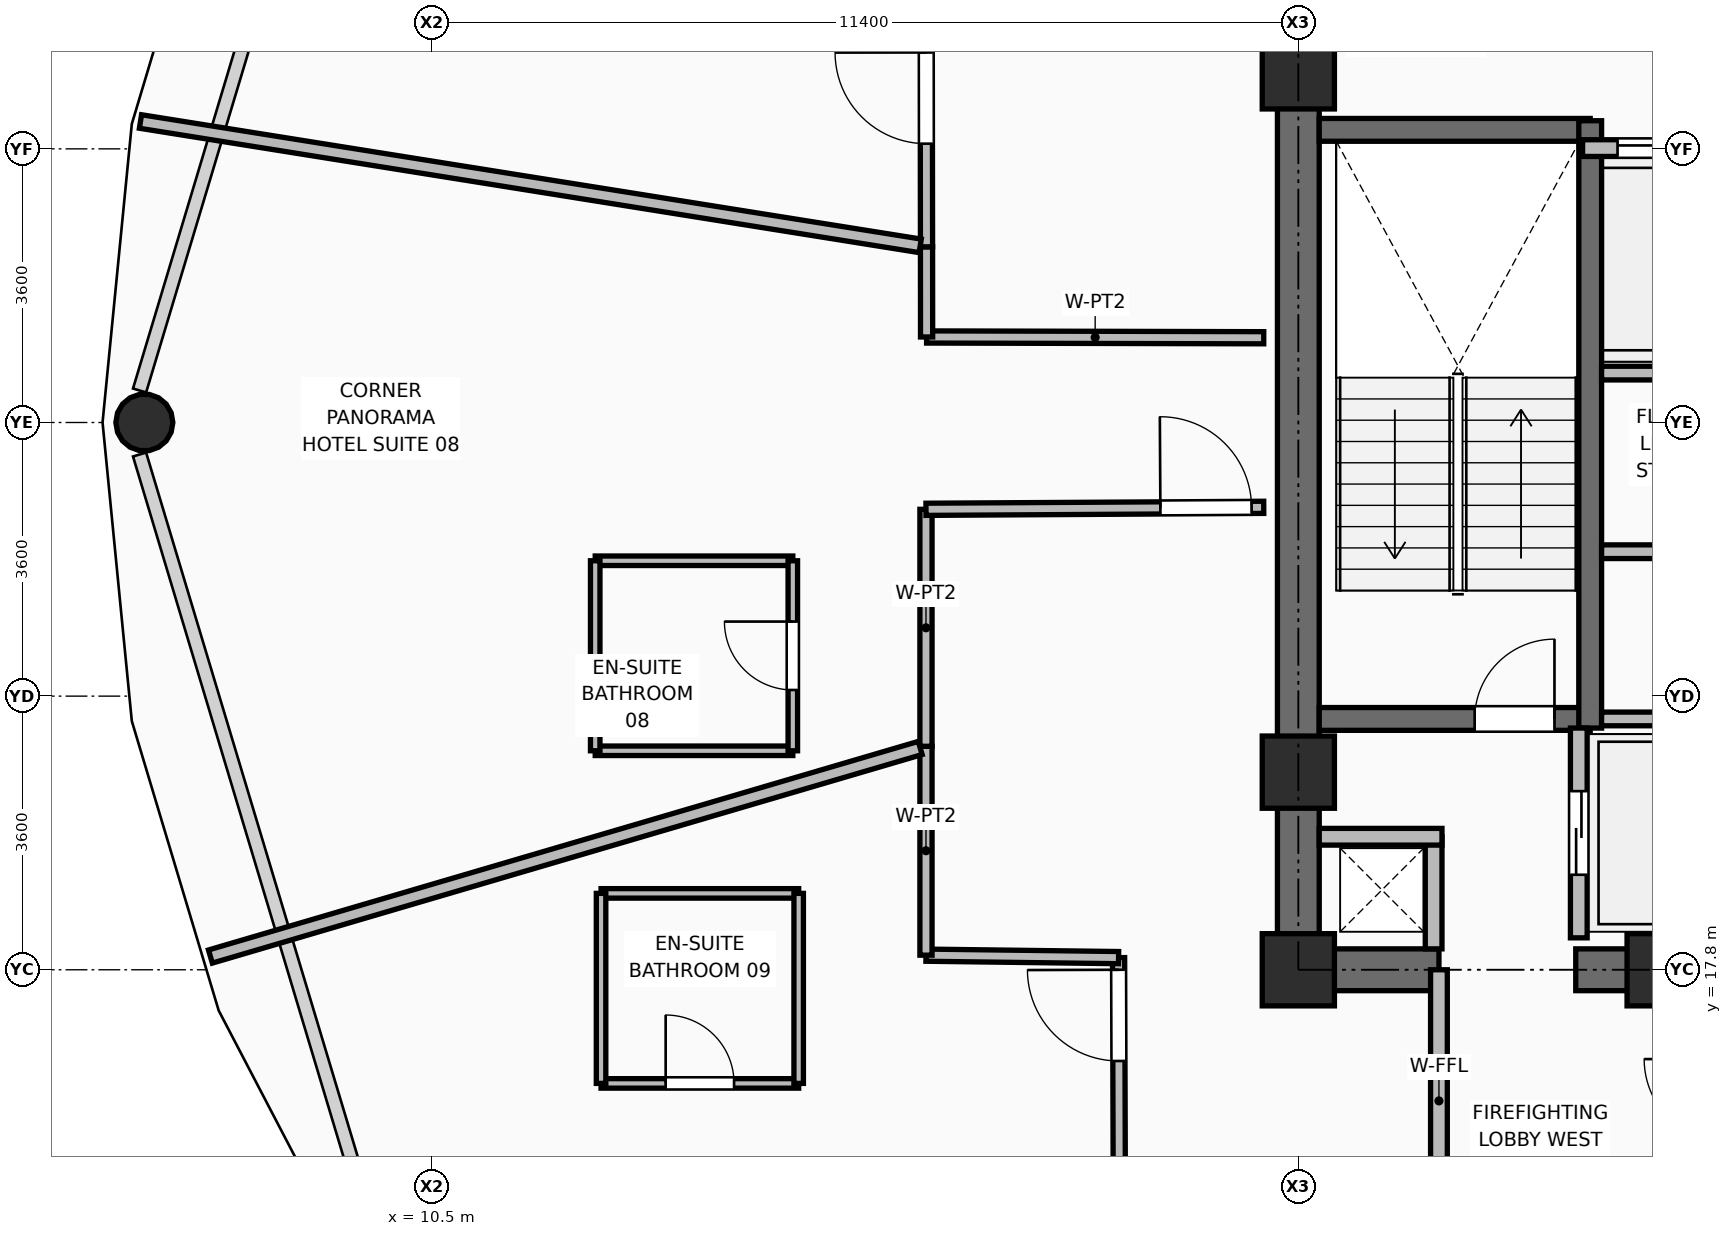
"""IFC4 building model, lengths in metres.
Left out: names, types, materials, properties, quantities, classifications, styles, units other than length and angle.
Written with IfcOpenShell. Run it as: python <this file> out.ifc"""

import sys

from ifc_helpers import new_model, si_unit, direction, frame, frame_2d, origin, origin_2d, place, context, subcontext, project, spatial, rectangle, hollow_circle, extrude, element, fill, save


model = new_model("IFC4")
c1 = context("Model", 3, precision=1e-05, world=origin(), true_north=direction((0.0, 1.0)))
c2 = subcontext(c1, "Body", "Model", "MODEL_VIEW")
j1 = project(units=[si_unit("LENGTHUNIT", "METRE"), si_unit("PLANEANGLEUNIT", "RADIAN")], contexts=[c1])
p1 = place(None, origin())
s1 = spatial("IfcSite", under=j1, at=p1, CompositionType="ELEMENT")
p2 = place(p1, origin())
s2 = spatial("IfcBuilding", under=s1, at=p2, CompositionType="ELEMENT")
p3 = place(p2, frame((0.0, 0.0, 149.7)))
s3 = spatial("IfcBuildingStorey", under=s2, at=p3, CompositionType="ELEMENT", Elevation=149.7)
for number, where, z_axis, x_axis in (
    (1, (21.9, 17.8, 0.0), (0.0, 0.0, 1.0), (1.0, 0.0, 0.0)),
    (2, (26.7, 17.8, 0.0), (0.0, 0.0, 1.0), (1.0, 0.0, 0.0)),
    (3, (21.9, 20.4, 0.0), (0.0, 0.0, 1.0), (1.0, 0.0, 0.0)),
    (4, (21.9, 29.6, 0.0), (0.0, 0.0, 1.0), (1.0, 0.0, 0.0)),
):
    element("IfcColumn", number, at=place(p3, frame(where, z_axis=z_axis, x_axis=x_axis)), inside=s3, PredefinedType="COLUMN", context=c2, shape_type="SweptSolid", body=[
        extrude(rectangle(XDim=0.95, YDim=0.95, at=origin_2d()), origin(), (0.0, 0.0, 1.0), 3.75),
    ])
p4 = place(p3, frame((6.717, 25.0, 0.0), z_axis=(0.0, 0.0, 1.0), x_axis=(1.0, 0.0, 0.0)))
e5 = element("IfcColumn", 5, at=p4, inside=s3, PredefinedType="COLUMN", context=c2, shape_type="SweptSolid", body=[
    extrude(hollow_circle(Radius=0.375, WallThickness=0.035, at=origin_2d()), origin(), (0.0, 0.0, 1.0), 3.57),
])
p5 = place(p3, frame((21.625, 17.8, 0.0), z_axis=(0.0, 0.0, 1.0), x_axis=(1.0, 0.0, 0.0)))
e6 = element("IfcWall", 6, at=p5, inside=s3, PredefinedType="SHEAR", context=c2, shape_type="SweptSolid", body=[
    extrude(rectangle(XDim=2.125, YDim=0.55, at=frame_2d((1.062, 0.0))), origin(), (0.0, 0.0, 1.0), 3.57),
])
p6 = place(p3, frame((25.55, 17.8, 0.0), z_axis=(0.0, 0.0, 1.0), x_axis=(1.0, 0.0, 0.0)))
e7 = element("IfcWall", 7, at=p6, inside=s3, PredefinedType="SHEAR", context=c2, shape_type="SweptSolid", body=[
    extrude(rectangle(XDim=6.9, YDim=0.55, at=frame_2d((3.45, 0.0))), origin(), (0.0, 0.0, 1.0), 3.57),
])
p7 = place(p3, frame((21.9, 18.075, 0.0), z_axis=(0.0, 0.0, 1.0), x_axis=(0.0, 1.0, 0.0)))
e8 = element("IfcWall", 8, at=p7, inside=s3, PredefinedType="SHEAR", context=c2, shape_type="SweptSolid", body=[
    extrude(rectangle(XDim=14.1, YDim=0.55, at=frame_2d((7.05, 0.0))), origin(), (0.0, 0.0, 1.0), 3.57),
])
p8 = place(p3, frame((22.175, 21.1, 0.0), z_axis=(0.0, 0.0, 1.0), x_axis=(1.0, 0.0, 0.0)))
e9 = element("IfcWall", 9, at=p8, inside=s3, PredefinedType="SHEAR", context=c2, shape_type="SweptSolid", body=[
    extrude(rectangle(XDim=3.565, YDim=0.3, at=frame_2d((1.782, 0.0))), origin(), (0.0, 0.0, 1.0), 3.57),
])
p9 = place(p8, frame((2.045, 0.0, 0.0)))
e10 = element("IfcOpeningElement", 10, at=p9, cuts=e9, PredefinedType="OPENING", context=c2, shape_type="SweptSolid", body=[
    extrude(rectangle(XDim=1.05, YDim=2.1, at=frame_2d((0.525, 1.05))), frame((0.0, 0.16, 0.0), z_axis=(0.0, -1.0, 0.0), x_axis=(1.0, 0.0, 0.0)), (0.0, 0.0, 1.0), 0.32),
])
p10 = place(p3, frame((22.175, 28.85, 0.0), z_axis=(0.0, 0.0, 1.0), x_axis=(1.0, 0.0, 0.0)))
e11 = element("IfcWall", 11, at=p10, inside=s3, PredefinedType="SHEAR", context=c2, shape_type="SweptSolid", body=[
    extrude(rectangle(XDim=3.565, YDim=0.3, at=frame_2d((1.782, 0.0))), origin(), (0.0, 0.0, 1.0), 3.57),
])
p11 = place(p3, frame((25.74, 20.98, 0.0), z_axis=(0.0, 0.0, 1.0), x_axis=(0.0, 1.0, 0.0)))
e12 = element("IfcWall", 12, at=p11, inside=s3, PredefinedType="SHEAR", context=c2, shape_type="SweptSolid", body=[
    extrude(rectangle(XDim=7.99, YDim=0.3, at=frame_2d((3.995, 0.0))), origin(), (0.0, 0.0, 1.0), 3.57),
])
p12 = place(p3, frame((23.68, 18.075, 0.0), z_axis=(0.0, 0.0, 1.0), x_axis=(0.0, 1.0, 0.0)))
e13 = element("IfcWall", 13, at=p12, inside=s3, PredefinedType="PARTITIONING", context=c2, shape_type="SweptSolid", body=[
    extrude(rectangle(XDim=1.475, YDim=0.22, at=frame_2d((0.738, 0.0))), origin(), (0.0, 0.0, 1.0), 3.55),
])
p13 = place(p3, frame((22.175, 19.55, 0.0), z_axis=(0.0, 0.0, 1.0), x_axis=(1.0, 0.0, 0.0)))
e14 = element("IfcWall", 14, at=p13, inside=s3, PredefinedType="PARTITIONING", context=c2, shape_type="SweptSolid", body=[
    extrude(rectangle(XDim=1.615, YDim=0.22, at=frame_2d((0.808, 0.0))), origin(), (0.0, 0.0, 1.0), 2.595),
])
p14 = place(p3, frame((25.59, 18.22, 0.0), z_axis=(0.0, 0.0, 1.0), x_axis=(0.0, 1.0, 0.0)))
e15 = element("IfcWall", 15, at=p14, inside=s3, PredefinedType="PARTITIONING", context=c2, shape_type="SweptSolid", body=[
    extrude(rectangle(XDim=2.76, YDim=0.22, at=frame_2d((1.38, 0.0))), origin(), (0.0, 0.0, 1.0), 3.55),
])
p15 = place(p14, frame((0.83, 0.0, 0.0)))
e16 = element("IfcOpeningElement", 16, at=p15, cuts=e15, PredefinedType="OPENING", context=c2, shape_type="SweptSolid", body=[
    extrude(rectangle(XDim=1.1, YDim=2.2, at=frame_2d((0.55, 1.1))), frame((0.0, 0.12, 0.0), z_axis=(0.0, -1.0, 0.0), x_axis=(1.0, 0.0, 0.0)), (0.0, 0.0, 1.0), 0.24),
])
p16 = place(p3, frame((25.64, 28.61, 0.0), z_axis=(0.0, 0.0, 1.0), x_axis=(1.0, 0.0, 0.0)))
e17 = element("IfcWall", 17, at=p16, inside=s3, PredefinedType="PARTITIONING", context=c2, shape_type="SweptSolid", body=[
    extrude(rectangle(XDim=2.02, YDim=0.22, at=frame_2d((1.01, 0.0))), origin(), (0.0, 0.0, 1.0), 3.55),
])
p17 = place(p16, frame((0.46, 0.0, 0.0)))
e18 = element("IfcOpeningElement", 18, at=p17, cuts=e17, PredefinedType="OPENING", context=c2, shape_type="SweptSolid", body=[
    extrude(rectangle(XDim=1.1, YDim=2.2, at=frame_2d((0.55, 1.1))), frame((0.0, 0.12, 0.0), z_axis=(0.0, -1.0, 0.0), x_axis=(1.0, 0.0, 0.0)), (0.0, 0.0, 1.0), 0.24),
])
for number, where, z_axis, x_axis in (
    (19, (25.89, 21.1, 0.0), (0.0, 0.0, 1.0), (1.0, 0.0, 0.0)),
    (20, (25.89, 25.65, 0.0), (0.0, 0.0, 1.0), (1.0, 0.0, 0.0)),
):
    element("IfcWall", number, at=place(p3, frame(where, z_axis=z_axis, x_axis=x_axis)), inside=s3, PredefinedType="PARTITIONING", context=c2, shape_type="SweptSolid", body=[
        extrude(rectangle(XDim=1.7, YDim=0.18, at=frame_2d((0.85, 0.0))), origin(), (0.0, 0.0, 1.0), 3.55),
    ])
p18 = place(p3, frame((25.89, 23.3, 0.0), z_axis=(0.0, 0.0, 1.0), x_axis=(1.0, 0.0, 0.0)))
e21 = element("IfcWall", 21, at=p18, inside=s3, PredefinedType="PARTITIONING", context=c2, shape_type="SweptSolid", body=[
    extrude(rectangle(XDim=1.79, YDim=0.18, at=frame_2d((0.895, 0.0))), origin(), (0.0, 0.0, 1.0), 3.55),
])
p19 = place(p3, frame((23.75, 14.35, 0.0), z_axis=(0.0, 0.0, 1.0), x_axis=(0.0, 1.0, 0.0)))
e22 = element("IfcWall", 22, at=p19, inside=s3, PredefinedType="PARTITIONING", context=c2, shape_type="SweptSolid", body=[
    extrude(rectangle(XDim=3.45, YDim=0.22, at=frame_2d((1.725, 0.0))), origin(), (0.0, 0.0, 1.0), 3.006),
])
p20 = place(p3, frame((21.445, 26.115, 0.0), z_axis=(0.0, 0.0, 1.0), x_axis=(-0.999997454189, 0.002256460959, 0.0)))
e23 = element("IfcWall", 23, at=p20, inside=s3, PredefinedType="PARTITIONING", context=c2, shape_type="SweptSolid", body=[
    extrude(rectangle(XDim=4.436, YDim=0.16, at=frame_2d((2.218, 0.0))), origin(), (0.0, 0.0, 1.0), 2.595),
])
p21 = place(p3, frame((17.009, 26.125, 0.0), z_axis=(0.0, 0.0, 1.0), x_axis=(-0.00082338383, 0.999999661019, 0.0)))
e24 = element("IfcWall", 24, at=p21, inside=s3, PredefinedType="PARTITIONING", context=c2, shape_type="SweptSolid", body=[
    extrude(rectangle(XDim=1.186, YDim=0.16, at=frame_2d((0.593, 0.0))), origin(), (0.0, 0.0, 1.0), 3.55),
])
p22 = place(p3, frame((17.008, 27.311, 0.0), z_axis=(0.0, 0.0, 1.0), x_axis=(-0.001309879116, 0.999999142108, 0.0)))
e25 = element("IfcWall", 25, at=p22, inside=s3, PredefinedType="PARTITIONING", context=c2, shape_type="SweptSolid", body=[
    extrude(rectangle(XDim=3.914, YDim=0.16, at=frame_2d((1.957, 0.0))), origin(), (0.0, 0.0, 1.0), 3.55),
])
p23 = place(p22, frame((1.357, 0.0, 0.0)))
e26 = element("IfcOpeningElement", 26, at=p23, cuts=e25, PredefinedType="OPENING", context=c2, shape_type="SweptSolid", body=[
    extrude(rectangle(XDim=1.2, YDim=2.1, at=frame_2d((0.6, 1.05))), frame((0.0, 0.09, 0.0), z_axis=(0.0, -1.0, 0.0), x_axis=(1.0, 0.0, 0.0)), (0.0, 0.0, 1.0), 0.18),
])
p24 = place(p3, frame((19.548, 13.809, 0.0), z_axis=(0.0, 0.0, 1.0), x_axis=(-0.00317608091, 0.999994956242, 0.0)))
e27 = element("IfcWall", 27, at=p24, inside=s3, PredefinedType="PARTITIONING", context=c2, shape_type="SweptSolid", body=[
    extrude(rectangle(XDim=4.151, YDim=0.16, at=frame_2d((2.075, 0.0))), origin(), (0.0, 0.0, 1.0), 3.006),
])
p25 = place(p24, frame((2.791, 0.0, 0.0)))
e28 = element("IfcOpeningElement", 28, at=p25, cuts=e27, PredefinedType="OPENING", context=c2, shape_type="SweptSolid", body=[
    extrude(rectangle(XDim=1.2, YDim=2.1, at=frame_2d((0.6, 1.05))), frame((0.0, 0.09, 0.0), z_axis=(0.0, -1.0, 0.0), x_axis=(1.0, 0.0, 0.0)), (0.0, 0.0, 1.0), 0.18),
])
p26 = place(p3, frame((19.535, 17.96, 0.0), z_axis=(0.0, 0.0, 1.0), x_axis=(-0.999920356619, 0.01262063462, 0.0)))
e29 = element("IfcWall", 29, at=p26, inside=s3, PredefinedType="PARTITIONING", context=c2, shape_type="SweptSolid", body=[
    extrude(rectangle(XDim=2.534, YDim=0.16, at=frame_2d((1.267, 0.0))), origin(), (0.0, 0.0, 1.0), 3.55),
])
p27 = place(p3, frame((17.001, 17.992, 0.0), z_axis=(0.0, 0.0, 1.0), x_axis=(0.0, 1.0, 0.0)))
e30 = element("IfcWall", 30, at=p27, inside=s3, PredefinedType="PARTITIONING", context=c2, shape_type="SweptSolid", body=[
    extrude(rectangle(XDim=2.748, YDim=0.16, at=frame_2d((1.374, 0.0))), origin(), (0.0, 0.0, 1.0), 3.55),
])
p28 = place(p3, frame((17.001, 20.74, 0.0), z_axis=(0.0, 0.0, 1.0), x_axis=(0.0, 1.0, 0.0)))
e31 = element("IfcWall", 31, at=p28, inside=s3, PredefinedType="PARTITIONING", context=c2, shape_type="SweptSolid", body=[
    extrude(rectangle(XDim=3.118, YDim=0.16, at=frame_2d((1.559, 0.0))), origin(), (0.0, 0.0, 1.0), 3.006),
])
p29 = place(p3, frame((17.001, 23.858, 0.0), z_axis=(0.0, 0.0, 1.0), x_axis=(0.999982724113, 0.005878050403, 0.0)))
e32 = element("IfcWall", 32, at=p29, inside=s3, PredefinedType="PARTITIONING", context=c2, shape_type="SweptSolid", body=[
    extrude(rectangle(XDim=4.444, YDim=0.16, at=frame_2d((2.222, 0.0))), origin(), (0.0, 0.0, 1.0), 2.595),
])
p30 = place(p29, frame((3.084, 0.0, 0.0)))
e33 = element("IfcOpeningElement", 33, at=p30, cuts=e32, PredefinedType="OPENING", context=c2, shape_type="SweptSolid", body=[
    extrude(rectangle(XDim=1.2, YDim=2.1, at=frame_2d((0.6, 1.05))), frame((0.0, 0.09, 0.0), z_axis=(0.0, -1.0, 0.0), x_axis=(1.0, 0.0, 0.0)), (0.0, 0.0, 1.0), 0.18),
])
p31 = place(p3, frame((16.925, 27.324, 0.0), z_axis=(0.0, 0.0, 1.0), x_axis=(-0.987522476436, 0.157478120811, 0.0)))
e34 = element("IfcWall", 34, at=p31, inside=s3, PredefinedType="PARTITIONING", context=c2, shape_type="SweptSolid", body=[
    extrude(rectangle(XDim=10.389, YDim=0.18, at=frame_2d((5.194, 0.0))), origin(), (0.0, 0.0, 1.0), 2.852),
])
p32 = place(p3, frame((16.925, 20.718, 0.0), z_axis=(0.0, 0.0, 1.0), x_axis=(-0.959446138816, -0.2818920125, 0.0)))
e35 = element("IfcWall", 35, at=p32, inside=s3, PredefinedType="PARTITIONING", context=c2, shape_type="SweptSolid", body=[
    extrude(rectangle(XDim=9.734, YDim=0.18, at=frame_2d((4.867, 0.0))), origin(), (0.0, 0.0, 1.0), 2.852),
])
p33 = place(p3, frame((12.649, 20.681, 0.0), z_axis=(0.0, 0.0, 1.0), x_axis=(1.0, 0.0, 0.0)))
e36 = element("IfcWall", 36, at=p33, inside=s3, PredefinedType="PARTITIONING", context=c2, shape_type="SweptSolid", body=[
    extrude(rectangle(XDim=2.6, YDim=0.125, at=frame_2d((1.3, 0.0))), origin(), (0.0, 0.0, 1.0), 3.55),
])
p34 = place(p3, frame((12.649, 23.181, 0.0), z_axis=(0.0, 0.0, 1.0), x_axis=(1.0, 0.0, 0.0)))
e37 = element("IfcWall", 37, at=p34, inside=s3, PredefinedType="PARTITIONING", context=c2, shape_type="SweptSolid", body=[
    extrude(rectangle(XDim=2.6, YDim=0.125, at=frame_2d((1.3, 0.0))), origin(), (0.0, 0.0, 1.0), 3.006),
])
p35 = place(p3, frame((12.649, 20.681, 0.0), z_axis=(0.0, 0.0, 1.0), x_axis=(0.0, 1.0, 0.0)))
e38 = element("IfcWall", 38, at=p35, inside=s3, PredefinedType="PARTITIONING", context=c2, shape_type="SweptSolid", body=[
    extrude(rectangle(XDim=2.5, YDim=0.125, at=frame_2d((1.25, 0.0))), origin(), (0.0, 0.0, 1.0), 3.006),
])
p36 = place(p3, frame((15.249, 20.681, 0.0), z_axis=(0.0, 0.0, 1.0), x_axis=(0.0, 1.0, 0.0)))
e39 = element("IfcWall", 39, at=p36, inside=s3, PredefinedType="PARTITIONING", context=c2, shape_type="SweptSolid", body=[
    extrude(rectangle(XDim=2.5, YDim=0.125, at=frame_2d((1.25, 0.0))), origin(), (0.0, 0.0, 1.0), 3.006),
])
p37 = place(p36, frame((0.8, 0.0, 0.0)))
e40 = element("IfcOpeningElement", 40, at=p37, cuts=e39, PredefinedType="OPENING", context=c2, shape_type="SweptSolid", body=[
    extrude(rectangle(XDim=0.9, YDim=2.1, at=frame_2d((0.45, 1.05))), frame((0.0, 0.073, 0.0), z_axis=(0.0, -1.0, 0.0), x_axis=(1.0, 0.0, 0.0)), (0.0, 0.0, 1.0), 0.145),
])
p38 = place(p3, frame((12.726, 16.305, 0.0), z_axis=(0.0, 0.0, 1.0), x_axis=(1.0, 0.0, 0.0)))
e41 = element("IfcWall", 41, at=p38, inside=s3, PredefinedType="PARTITIONING", context=c2, shape_type="SweptSolid", body=[
    extrude(rectangle(XDim=2.6, YDim=0.125, at=frame_2d((1.3, 0.0))), origin(), (0.0, 0.0, 1.0), 3.55),
])
p39 = place(p38, frame((0.85, 0.0, 0.0)))
e42 = element("IfcOpeningElement", 42, at=p39, cuts=e41, PredefinedType="OPENING", context=c2, shape_type="SweptSolid", body=[
    extrude(rectangle(XDim=0.9, YDim=2.1, at=frame_2d((0.45, 1.05))), frame((0.0, 0.073, 0.0), z_axis=(0.0, -1.0, 0.0), x_axis=(1.0, 0.0, 0.0)), (0.0, 0.0, 1.0), 0.145),
])
p40 = place(p3, frame((12.726, 18.805, 0.0), z_axis=(0.0, 0.0, 1.0), x_axis=(1.0, 0.0, 0.0)))
e43 = element("IfcWall", 43, at=p40, inside=s3, PredefinedType="PARTITIONING", context=c2, shape_type="SweptSolid", body=[
    extrude(rectangle(XDim=2.6, YDim=0.125, at=frame_2d((1.3, 0.0))), origin(), (0.0, 0.0, 1.0), 3.55),
])
for number, where, z_axis, x_axis in (
    (44, (12.726, 16.305, 0.0), (0.0, 0.0, 1.0), (0.0, 1.0, 0.0)),
    (45, (15.326, 16.305, 0.0), (0.0, 0.0, 1.0), (0.0, 1.0, 0.0)),
):
    element("IfcWall", number, at=place(p3, frame(where, z_axis=z_axis, x_axis=x_axis)), inside=s3, PredefinedType="PARTITIONING", context=c2, shape_type="SweptSolid", body=[
        extrude(rectangle(XDim=2.5, YDim=0.125, at=frame_2d((1.25, 0.0))), origin(), (0.0, 0.0, 1.0), 3.55),
    ])
p41 = place(p9, origin())
e46 = element("IfcDoor", 46, at=p41, inside=s3, OperationType="SINGLE_SWING_RIGHT", PredefinedType="DOOR", context=c2, shape_type="SweptSolid", body=[
    extrude(rectangle(XDim=1.05, YDim=2.1, at=frame_2d((0.525, 1.05))), frame((0.0, 0.025, 0.0), z_axis=(0.0, -1.0, 0.0), x_axis=(1.0, 0.0, 0.0)), (0.0, 0.0, 1.0), 0.05),
])
fill(e10, e46)
p42 = place(p15, origin())
e47 = element("IfcDoor", 47, at=p42, inside=s3, OperationType="DOUBLE_DOOR_SLIDING", PredefinedType="DOOR", context=c2, shape_type="SweptSolid", body=[
    extrude(rectangle(XDim=1.1, YDim=2.2, at=frame_2d((0.55, 1.1))), frame((0.0, 0.025, 0.0), z_axis=(0.0, -1.0, 0.0), x_axis=(1.0, 0.0, 0.0)), (0.0, 0.0, 1.0), 0.05),
])
fill(e16, e47)
p43 = place(p17, origin())
e48 = element("IfcDoor", 48, at=p43, inside=s3, OperationType="DOUBLE_DOOR_SLIDING", PredefinedType="DOOR", context=c2, shape_type="SweptSolid", body=[
    extrude(rectangle(XDim=1.1, YDim=2.2, at=frame_2d((0.55, 1.1))), frame((0.0, 0.025, 0.0), z_axis=(0.0, -1.0, 0.0), x_axis=(1.0, 0.0, 0.0)), (0.0, 0.0, 1.0), 0.05),
])
fill(e18, e48)
p44 = place(p23, origin())
e49 = element("IfcDoor", 49, at=p44, inside=s3, OperationType="SINGLE_SWING_RIGHT", PredefinedType="DOOR", context=c2, shape_type="SweptSolid", body=[
    extrude(rectangle(XDim=1.2, YDim=2.1, at=frame_2d((0.6, 1.05))), frame((0.0, 0.025, 0.0), z_axis=(0.0, -1.0, 0.0), x_axis=(1.0, 0.0, 0.0)), (0.0, 0.0, 1.0), 0.05),
])
fill(e26, e49)
p45 = place(p37, origin())
e50 = element("IfcDoor", 50, at=p45, inside=s3, OperationType="SINGLE_SWING_RIGHT", PredefinedType="DOOR", context=c2, shape_type="SweptSolid", body=[
    extrude(rectangle(XDim=0.9, YDim=2.1, at=frame_2d((0.45, 1.05))), frame((0.0, 0.025, 0.0), z_axis=(0.0, -1.0, 0.0), x_axis=(1.0, 0.0, 0.0)), (0.0, 0.0, 1.0), 0.05),
])
fill(e40, e50)
p46 = place(p30, origin())
e51 = element("IfcDoor", 51, at=p46, inside=s3, OperationType="SINGLE_SWING_LEFT", PredefinedType="DOOR", context=c2, shape_type="SweptSolid", body=[
    extrude(rectangle(XDim=1.2, YDim=2.1, at=frame_2d((0.6, 1.05))), frame((0.0, 0.025, 0.0), z_axis=(0.0, -1.0, 0.0), x_axis=(1.0, 0.0, 0.0)), (0.0, 0.0, 1.0), 0.05),
])
fill(e33, e51)
p47 = place(p39, origin())
e52 = element("IfcDoor", 52, at=p47, inside=s3, OperationType="SINGLE_SWING_LEFT", PredefinedType="DOOR", context=c2, shape_type="SweptSolid", body=[
    extrude(rectangle(XDim=0.9, YDim=2.1, at=frame_2d((0.45, 1.05))), frame((0.0, 0.025, 0.0), z_axis=(0.0, -1.0, 0.0), x_axis=(1.0, 0.0, 0.0)), (0.0, 0.0, 1.0), 0.05),
])
fill(e42, e52)
p48 = place(p25, origin())
e53 = element("IfcDoor", 53, at=p48, inside=s3, OperationType="SINGLE_SWING_RIGHT", PredefinedType="DOOR", context=c2, shape_type="SweptSolid", body=[
    extrude(rectangle(XDim=1.2, YDim=2.1, at=frame_2d((0.6, 1.05))), frame((0.0, 0.025, 0.0), z_axis=(0.0, -1.0, 0.0), x_axis=(1.0, 0.0, 0.0)), (0.0, 0.0, 1.0), 0.05),
])
fill(e28, e53)
save(model, sys.argv[1])
